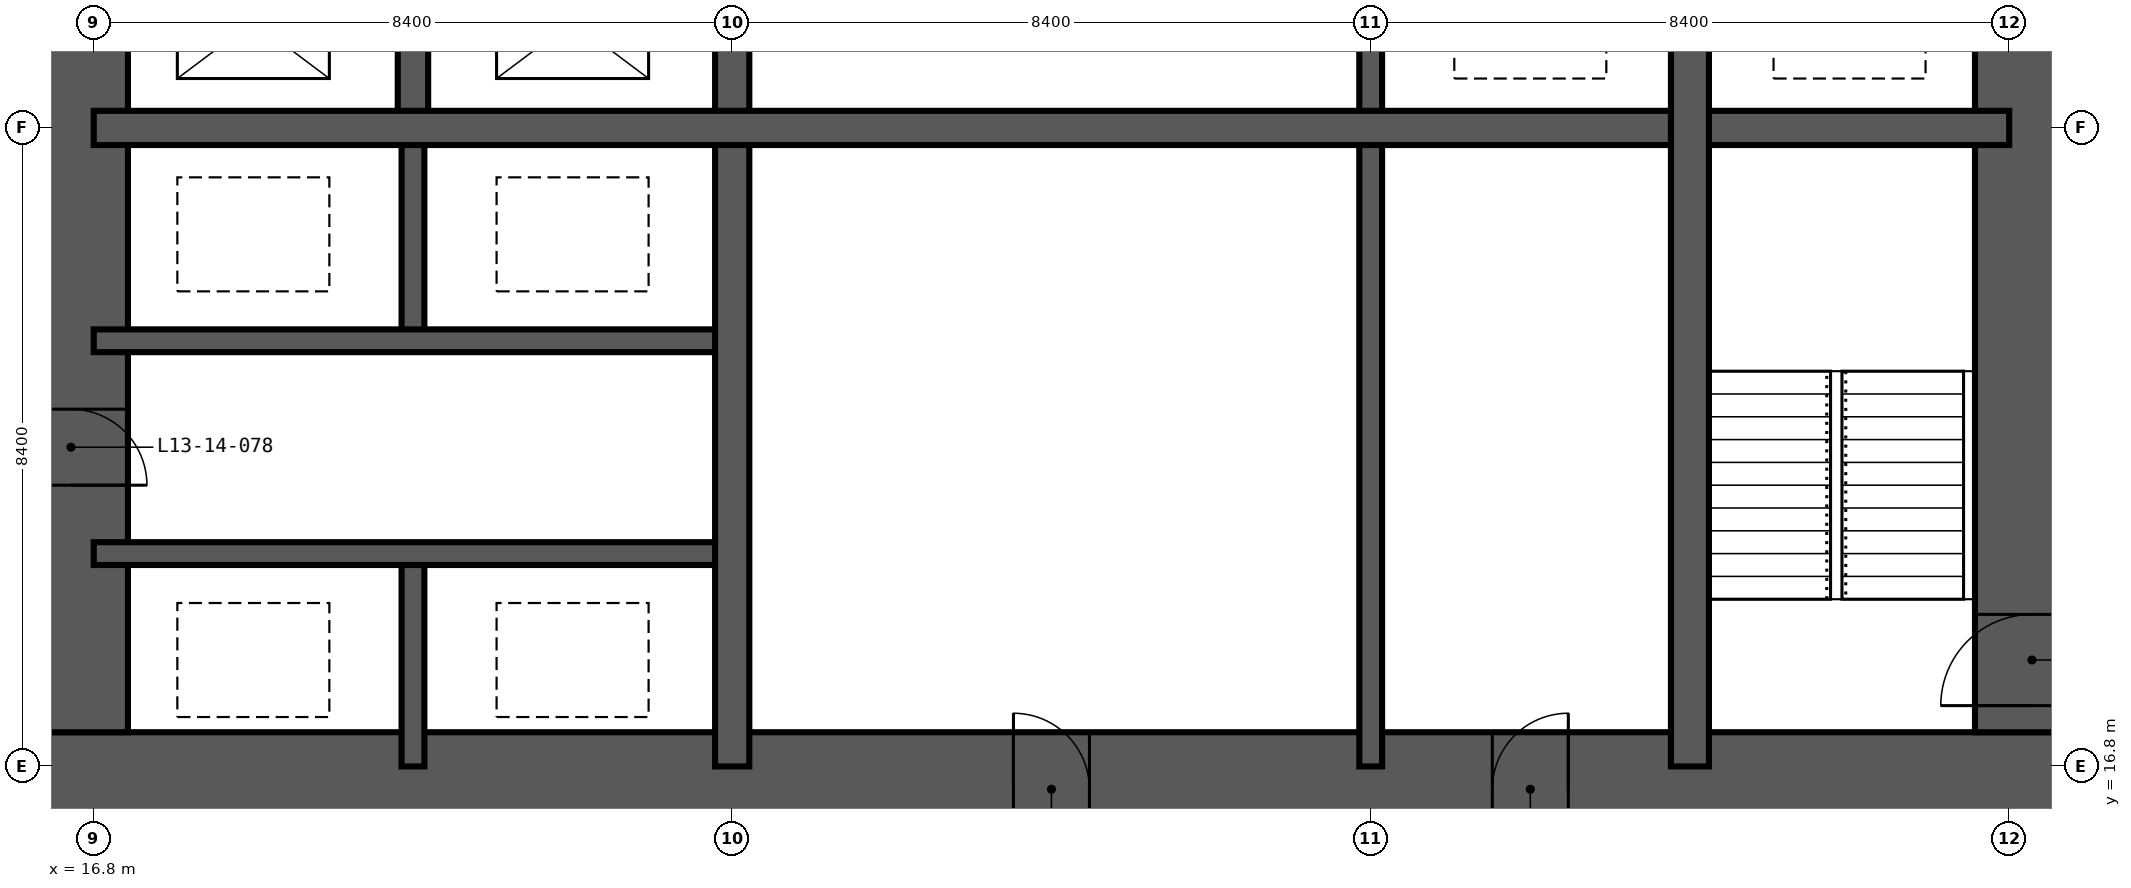
"""IFC4 building model, lengths in metres.
Left out: names, types, materials, properties, quantities, classifications, styles, units other than length and angle.
Written with IfcOpenShell. Run it as: python <this file> out.ifc"""

import sys

from ifc_helpers import new_model, si_unit, direction, frame, frame_2d, origin, place, context, subcontext, project, spatial, rectangle, extrude, element, fill, save


model = new_model("IFC4")
c1 = context("Model", 3, precision=1e-05, world=origin(), true_north=direction((0.0, 1.0)))
c2 = subcontext(c1, "Body", "Model", "MODEL_VIEW")
j1 = project(units=[si_unit("LENGTHUNIT", "METRE"), si_unit("PLANEANGLEUNIT", "RADIAN")], contexts=[c1])
p1 = place(None, origin())
s1 = spatial("IfcSite", under=j1, at=p1, CompositionType="ELEMENT")
p2 = place(p1, origin())
s2 = spatial("IfcBuilding", under=s1, at=p2, CompositionType="ELEMENT")
p3 = place(p2, frame((0.0, 0.0, 55.8)))
s3 = spatial("IfcBuildingStorey", under=s2, at=p3, CompositionType="ELEMENT", Elevation=55.8)
p4 = place(p3, frame((15.75, 16.5, -0.35), z_axis=(0.0, 0.0, 1.0), x_axis=(1.0, 0.0, 0.0)))
e1 = element("IfcWall", 1, at=p4, inside=s3, PredefinedType="SHEAR", context=c2, shape_type="SweptSolid", body=[
    extrude(rectangle(XDim=27.3, YDim=1.5, at=frame_2d((13.65, 0.0))), origin(), (0.0, 0.0, 1.0), 3.6),
])
p5 = place(p4, frame((13.15, 0.0, 0.35)))
e2 = element("IfcOpeningElement", 2, at=p5, cuts=e1, PredefinedType="OPENING", context=c2, shape_type="SweptSolid", body=[
    extrude(rectangle(XDim=1.0, YDim=2.1, at=frame_2d((0.5, 1.05))), frame((0.0, 0.76, 0.0), z_axis=(0.0, -1.0, 0.0), x_axis=(1.0, 0.0, 0.0)), (0.0, 0.0, 1.0), 1.52),
])
p6 = place(p4, frame((19.45, 0.0, 0.35)))
e3 = element("IfcOpeningElement", 3, at=p6, cuts=e1, PredefinedType="OPENING", context=c2, shape_type="SweptSolid", body=[
    extrude(rectangle(XDim=1.0, YDim=2.1, at=frame_2d((0.5, 1.05))), frame((0.0, 0.76, 0.0), z_axis=(0.0, -1.0, 0.0), x_axis=(1.0, 0.0, 0.0)), (0.0, 0.0, 1.0), 1.52),
])
p7 = place(p3, frame((42.3, 17.25, -0.35), z_axis=(0.0, 0.0, 1.0), x_axis=(0.0, 1.0, 0.0)))
e4 = element("IfcWall", 4, at=p7, inside=s3, PredefinedType="SHEAR", context=c2, shape_type="SweptSolid", body=[
    extrude(rectangle(XDim=24.3, YDim=1.5, at=frame_2d((12.15, 0.0))), origin(), (0.0, 0.0, 1.0), 3.6),
])
p8 = place(p7, frame((0.35, 0.0, 0.35)))
e5 = element("IfcOpeningElement", 5, at=p8, cuts=e4, PredefinedType="OPENING", context=c2, shape_type="SweptSolid", body=[
    extrude(rectangle(XDim=1.2, YDim=2.2, at=frame_2d((0.6, 1.1))), frame((0.0, 0.76, 0.0), z_axis=(0.0, -1.0, 0.0), x_axis=(1.0, 0.0, 0.0)), (0.0, 0.0, 1.0), 1.52),
])
p9 = place(p7, frame((11.65, 0.0, 0.35)))
e6 = element("IfcOpeningElement", 6, at=p9, cuts=e4, PredefinedType="OPENING", context=c2, shape_type="SweptSolid", body=[
    extrude(rectangle(XDim=1.0, YDim=2.1, at=frame_2d((0.5, 1.05))), frame((0.0, 0.76, 0.0), z_axis=(0.0, -1.0, 0.0), x_axis=(1.0, 0.0, 0.0)), (0.0, 0.0, 1.0), 1.52),
])
p10 = place(p7, frame((20.05, 0.0, 0.35)))
e7 = element("IfcOpeningElement", 7, at=p10, cuts=e4, PredefinedType="OPENING", context=c2, shape_type="SweptSolid", body=[
    extrude(rectangle(XDim=1.0, YDim=2.1, at=frame_2d((0.5, 1.05))), frame((0.0, 0.76, 0.0), z_axis=(0.0, -1.0, 0.0), x_axis=(1.0, 0.0, 0.0)), (0.0, 0.0, 1.0), 1.52),
])
p11 = place(p3, frame((16.5, 41.55, -0.35), z_axis=(0.0, 0.0, 1.0), x_axis=(0.0, -1.0, 0.0)))
e8 = element("IfcWall", 8, at=p11, inside=s3, PredefinedType="SHEAR", context=c2, shape_type="SweptSolid", body=[
    extrude(rectangle(XDim=24.3, YDim=1.5, at=frame_2d((12.15, 0.0))), origin(), (0.0, 0.0, 1.0), 3.6),
])
p12 = place(p11, frame((11.25, 0.0, 0.35)))
e9 = element("IfcOpeningElement", 9, at=p12, cuts=e8, PredefinedType="OPENING", context=c2, shape_type="SweptSolid", body=[
    extrude(rectangle(XDim=1.8, YDim=2.2, at=frame_2d((0.9, 1.1))), frame((0.0, 0.76, 0.0), z_axis=(0.0, -1.0, 0.0), x_axis=(1.0, 0.0, 0.0)), (0.0, 0.0, 1.0), 1.52),
])
p13 = place(p11, frame((20.05, 0.0, 0.35)))
e10 = element("IfcOpeningElement", 10, at=p13, cuts=e8, PredefinedType="OPENING", context=c2, shape_type="SweptSolid", body=[
    extrude(rectangle(XDim=1.0, YDim=2.1, at=frame_2d((0.5, 1.05))), frame((0.0, 0.76, 0.0), z_axis=(0.0, -1.0, 0.0), x_axis=(1.0, 0.0, 0.0)), (0.0, 0.0, 1.0), 1.52),
])
p14 = place(p11, frame((5.35, 0.0, 0.35)))
e11 = element("IfcOpeningElement", 11, at=p14, cuts=e8, PredefinedType="OPENING", context=c2, shape_type="SweptSolid", body=[
    extrude(rectangle(XDim=1.0, YDim=2.1, at=frame_2d((0.5, 1.05))), frame((0.0, 0.76, 0.0), z_axis=(0.0, -1.0, 0.0), x_axis=(1.0, 0.0, 0.0)), (0.0, 0.0, 1.0), 1.52),
])
for number, where, z_axis, x_axis in (
    (12, (21.0, 16.8, -0.35), (0.0, 0.0, 1.0), (0.0, 1.0, 0.0)),
    (13, (21.0, 22.4, -0.35), (0.0, 0.0, 1.0), (0.0, 1.0, 0.0)),
):
    element("IfcWall", number, at=place(p3, frame(where, z_axis=z_axis, x_axis=x_axis)), inside=s3, PredefinedType="SHEAR", context=c2, shape_type="SweptSolid", body=[
        extrude(rectangle(XDim=2.8, YDim=0.3, at=frame_2d((1.4, 0.0))), origin(), (0.0, 0.0, 1.0), 3.6),
    ])
p15 = place(p3, frame((33.6, 16.8, -0.35), z_axis=(0.0, 0.0, 1.0), x_axis=(0.0, 1.0, 0.0)))
e14 = element("IfcWall", 14, at=p15, inside=s3, PredefinedType="SHEAR", context=c2, shape_type="SweptSolid", body=[
    extrude(rectangle(XDim=25.2, YDim=0.3, at=frame_2d((12.6, 0.0))), origin(), (0.0, 0.0, 1.0), 3.6),
])
p16 = place(p15, frame((22.5, 0.0, 0.35)))
e15 = element("IfcOpeningElement", 15, at=p16, cuts=e14, PredefinedType="OPENING", context=c2, shape_type="SweptSolid", body=[
    extrude(rectangle(XDim=1.2, YDim=2.2, at=frame_2d((0.6, 1.1))), frame((0.0, 0.16, 0.0), z_axis=(0.0, -1.0, 0.0), x_axis=(1.0, 0.0, 0.0)), (0.0, 0.0, 1.0), 0.32),
])
p17 = place(p15, frame((18.3, 0.0, 0.35)))
e16 = element("IfcOpeningElement", 16, at=p17, cuts=e14, PredefinedType="OPENING", context=c2, shape_type="SweptSolid", body=[
    extrude(rectangle(XDim=1.2, YDim=2.2, at=frame_2d((0.6, 1.1))), frame((0.0, 0.16, 0.0), z_axis=(0.0, -1.0, 0.0), x_axis=(1.0, 0.0, 0.0)), (0.0, 0.0, 1.0), 0.32),
])
p18 = place(p15, frame((12.1, 0.0, 0.35)))
e17 = element("IfcOpeningElement", 17, at=p18, cuts=e14, PredefinedType="OPENING", context=c2, shape_type="SweptSolid", body=[
    extrude(rectangle(XDim=1.0, YDim=2.1, at=frame_2d((0.5, 1.05))), frame((0.0, 0.16, 0.0), z_axis=(0.0, -1.0, 0.0), x_axis=(1.0, 0.0, 0.0)), (0.0, 0.0, 1.0), 0.32),
])
for number, where, z_axis, x_axis in (
    (18, (16.8, 19.6, -0.35), (0.0, 0.0, 1.0), (1.0, 0.0, 0.0)),
    (19, (16.8, 22.4, -0.35), (0.0, 0.0, 1.0), (1.0, 0.0, 0.0)),
):
    element("IfcWall", number, at=place(p3, frame(where, z_axis=z_axis, x_axis=x_axis)), inside=s3, PredefinedType="SHEAR", context=c2, shape_type="SweptSolid", body=[
        extrude(rectangle(XDim=8.4, YDim=0.3, at=frame_2d((4.2, 0.0))), origin(), (0.0, 0.0, 1.0), 3.6),
    ])
p19 = place(p3, frame((21.0, 25.2, -0.35), z_axis=(0.0, 0.0, 1.0), x_axis=(0.0, 1.0, 0.0)))
e20 = element("IfcWall", 20, at=p19, inside=s3, PredefinedType="SHEAR", context=c2, shape_type="SweptSolid", body=[
    extrude(rectangle(XDim=2.8, YDim=0.4, at=frame_2d((1.4, 0.0))), origin(), (0.0, 0.0, 1.0), 3.6),
])
for number, where, z_axis, x_axis in (
    (21, (25.2, 16.8, -0.35), (0.0, 0.0, 1.0), (0.0, 1.0, 0.0)),
    (22, (16.8, 25.2, -0.35), (0.0, 0.0, 1.0), (1.0, 0.0, 0.0)),
):
    element("IfcWall", number, at=place(p3, frame(where, z_axis=z_axis, x_axis=x_axis)), inside=s3, PredefinedType="SHEAR", context=c2, shape_type="SweptSolid", body=[
        extrude(rectangle(XDim=25.2, YDim=0.45, at=frame_2d((12.6, 0.0))), origin(), (0.0, 0.0, 1.0), 3.6),
    ])
p20 = place(p3, frame((37.8, 16.8, -0.35), z_axis=(0.0, 0.0, 1.0), x_axis=(0.0, 1.0, 0.0)))
e23 = element("IfcWall", 23, at=p20, inside=s3, PredefinedType="SHEAR", context=c2, shape_type="SweptSolid", body=[
    extrude(rectangle(XDim=11.2, YDim=0.5, at=frame_2d((5.6, 0.0))), origin(), (0.0, 0.0, 1.0), 3.6),
])
p21 = place(p8, origin())
e24 = element("IfcDoor", 24, at=p21, inside=s3, OperationType="SINGLE_SWING_LEFT", PredefinedType="DOOR", context=c2, shape_type="SweptSolid", body=[
    extrude(rectangle(XDim=1.2, YDim=2.2, at=frame_2d((0.6, 1.1))), frame((0.0, 0.025, 0.0), z_axis=(0.0, -1.0, 0.0), x_axis=(1.0, 0.0, 0.0)), (0.0, 0.0, 1.0), 0.05),
])
fill(e5, e24)
p22 = place(p13, origin())
e25 = element("IfcDoor", 25, at=p22, inside=s3, OperationType="SINGLE_SWING_RIGHT", PredefinedType="DOOR", context=c2, shape_type="SweptSolid", body=[
    extrude(rectangle(XDim=1.0, YDim=2.1, at=frame_2d((0.5, 1.05))), frame((0.0, 0.025, 0.0), z_axis=(0.0, -1.0, 0.0), x_axis=(1.0, 0.0, 0.0)), (0.0, 0.0, 1.0), 0.05),
])
fill(e10, e25)
p23 = place(p5, origin())
e26 = element("IfcDoor", 26, at=p23, inside=s3, OperationType="SINGLE_SWING_LEFT", PredefinedType="DOOR", context=c2, shape_type="SweptSolid", body=[
    extrude(rectangle(XDim=1.0, YDim=2.1, at=frame_2d((0.5, 1.05))), frame((0.0, 0.025, 0.0), z_axis=(0.0, -1.0, 0.0), x_axis=(1.0, 0.0, 0.0)), (0.0, 0.0, 1.0), 0.05),
])
fill(e2, e26)
p24 = place(p6, origin())
e27 = element("IfcDoor", 27, at=p24, inside=s3, OperationType="SINGLE_SWING_RIGHT", PredefinedType="DOOR", context=c2, shape_type="SweptSolid", body=[
    extrude(rectangle(XDim=1.0, YDim=2.1, at=frame_2d((0.5, 1.05))), frame((0.0, 0.025, 0.0), z_axis=(0.0, -1.0, 0.0), x_axis=(1.0, 0.0, 0.0)), (0.0, 0.0, 1.0), 0.05),
])
fill(e3, e27)
save(model, sys.argv[1])
